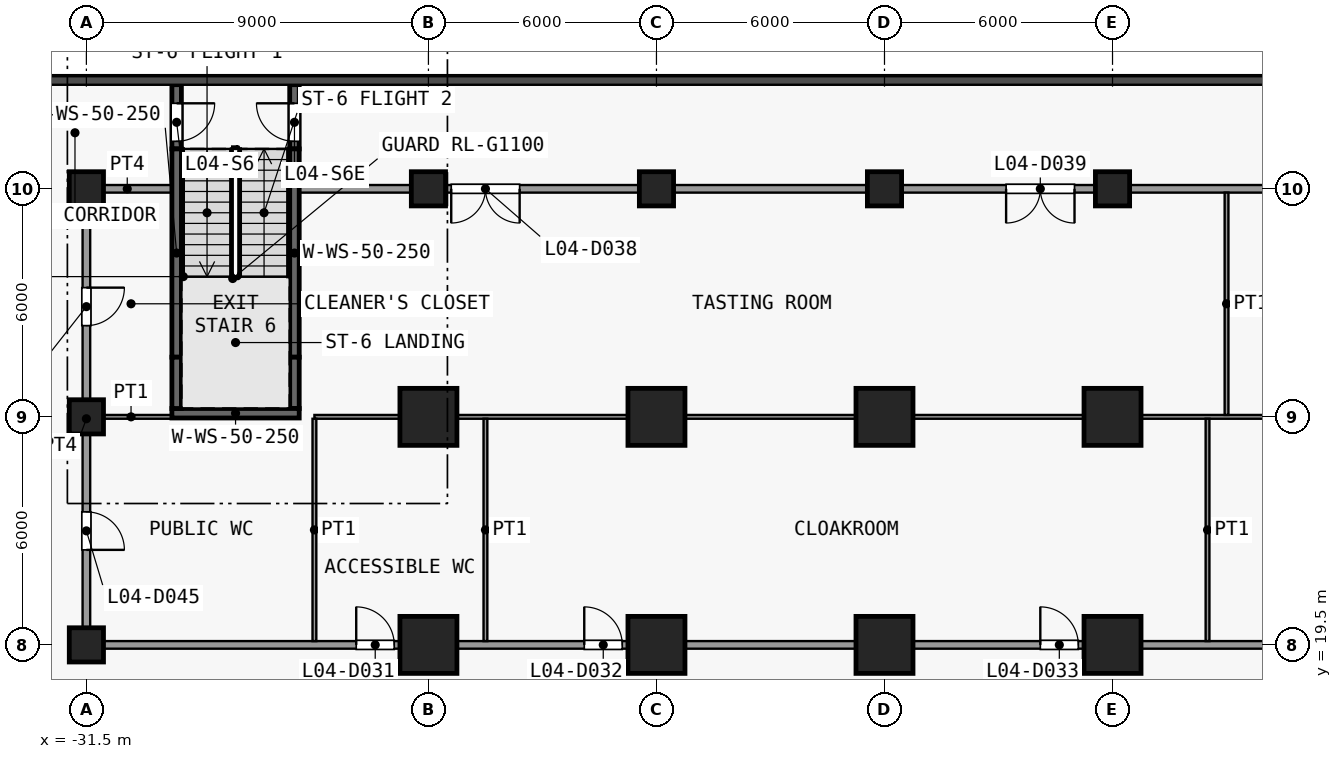
"""IFC4 building model, lengths in metres.
Left out: names, types, materials, properties, quantities, classifications, styles, units other than length and angle.
Written with IfcOpenShell. Run it as: python <this file> out.ifc"""

import sys

from ifc_helpers import new_model, si_unit, direction, frame, frame_2d, origin, origin_2d, place, context, subcontext, project, spatial, rectangle, extrude, element, fill, save


model = new_model("IFC4")
c1 = context("Model", 3, precision=1e-05, world=origin(), true_north=direction((0.0, 1.0)))
c2 = subcontext(c1, "Body", "Model", "MODEL_VIEW")
j1 = project(units=[si_unit("LENGTHUNIT", "METRE"), si_unit("PLANEANGLEUNIT", "RADIAN")], contexts=[c1])
p1 = place(None, origin())
s1 = spatial("IfcSite", under=j1, at=p1, CompositionType="ELEMENT")
p2 = place(p1, origin())
s2 = spatial("IfcBuilding", under=s1, at=p2, CompositionType="ELEMENT")
p3 = place(p2, frame((0.0, 0.0, 23.5)))
s3 = spatial("IfcBuildingStorey", under=s2, at=p3, CompositionType="ELEMENT", Elevation=23.5)
for number, where, z_axis, x_axis in (
    (1, (-31.5, 19.5, 0.0), (0.0, 0.0, 1.0), (1.0, 0.0, 0.0)),
    (2, (-31.5, 25.5, 0.0), (0.0, 0.0, 1.0), (1.0, 0.0, 0.0)),
    (3, (-31.5, 31.5, 0.0), (0.0, 0.0, 1.0), (1.0, 0.0, 0.0)),
):
    element("IfcColumn", number, at=place(p3, frame(where, z_axis=z_axis, x_axis=x_axis)), inside=s3, PredefinedType="COLUMN", context=c2, shape_type="SweptSolid", body=[
        extrude(rectangle(XDim=0.9, YDim=0.9, at=origin_2d()), origin(), (0.0, 0.0, 1.0), 4.5),
    ])
for number, where, z_axis, x_axis in (
    (4, (-22.5, 19.5, 0.0), (0.0, 0.0, 1.0), (1.0, 0.0, 0.0)),
    (5, (-22.5, 25.5, 0.0), (0.0, 0.0, 1.0), (1.0, 0.0, 0.0)),
):
    element("IfcColumn", number, at=place(p3, frame(where, z_axis=z_axis, x_axis=x_axis)), inside=s3, PredefinedType="COLUMN", context=c2, shape_type="SweptSolid", body=[
        extrude(rectangle(XDim=1.5, YDim=1.5, at=origin_2d()), origin(), (0.0, 0.0, 1.0), 4.5),
    ])
p4 = place(p3, frame((-22.5, 31.5, 0.0), z_axis=(0.0, 0.0, 1.0), x_axis=(1.0, 0.0, 0.0)))
e6 = element("IfcColumn", 6, at=p4, inside=s3, PredefinedType="COLUMN", context=c2, shape_type="SweptSolid", body=[
    extrude(rectangle(XDim=0.9, YDim=0.9, at=origin_2d()), origin(), (0.0, 0.0, 1.0), 4.5),
])
for number, where, z_axis, x_axis in (
    (7, (-16.5, 19.5, 0.0), (0.0, 0.0, 1.0), (1.0, 0.0, 0.0)),
    (8, (-16.5, 25.5, 0.0), (0.0, 0.0, 1.0), (1.0, 0.0, 0.0)),
):
    element("IfcColumn", number, at=place(p3, frame(where, z_axis=z_axis, x_axis=x_axis)), inside=s3, PredefinedType="COLUMN", context=c2, shape_type="SweptSolid", body=[
        extrude(rectangle(XDim=1.5, YDim=1.5, at=origin_2d()), origin(), (0.0, 0.0, 1.0), 4.5),
    ])
p5 = place(p3, frame((-16.5, 31.5, 0.0), z_axis=(0.0, 0.0, 1.0), x_axis=(1.0, 0.0, 0.0)))
e9 = element("IfcColumn", 9, at=p5, inside=s3, PredefinedType="COLUMN", context=c2, shape_type="SweptSolid", body=[
    extrude(rectangle(XDim=0.9, YDim=0.9, at=origin_2d()), origin(), (0.0, 0.0, 1.0), 4.5),
])
for number, where, z_axis, x_axis in (
    (10, (-10.5, 19.5, 0.0), (0.0, 0.0, 1.0), (1.0, 0.0, 0.0)),
    (11, (-10.5, 25.5, 0.0), (0.0, 0.0, 1.0), (1.0, 0.0, 0.0)),
):
    element("IfcColumn", number, at=place(p3, frame(where, z_axis=z_axis, x_axis=x_axis)), inside=s3, PredefinedType="COLUMN", context=c2, shape_type="SweptSolid", body=[
        extrude(rectangle(XDim=1.5, YDim=1.5, at=origin_2d()), origin(), (0.0, 0.0, 1.0), 4.5),
    ])
p6 = place(p3, frame((-10.5, 31.5, 0.0), z_axis=(0.0, 0.0, 1.0), x_axis=(1.0, 0.0, 0.0)))
e12 = element("IfcColumn", 12, at=p6, inside=s3, PredefinedType="COLUMN", context=c2, shape_type="SweptSolid", body=[
    extrude(rectangle(XDim=0.9, YDim=0.9, at=origin_2d()), origin(), (0.0, 0.0, 1.0), 4.5),
])
for number, where, z_axis, x_axis in (
    (13, (-4.5, 19.5, 0.0), (0.0, 0.0, 1.0), (1.0, 0.0, 0.0)),
    (14, (-4.5, 25.5, 0.0), (0.0, 0.0, 1.0), (1.0, 0.0, 0.0)),
):
    element("IfcColumn", number, at=place(p3, frame(where, z_axis=z_axis, x_axis=x_axis)), inside=s3, PredefinedType="COLUMN", context=c2, shape_type="SweptSolid", body=[
        extrude(rectangle(XDim=1.5, YDim=1.5, at=origin_2d()), origin(), (0.0, 0.0, 1.0), 4.5),
    ])
p7 = place(p3, frame((-4.5, 31.5, 0.0), z_axis=(0.0, 0.0, 1.0), x_axis=(1.0, 0.0, 0.0)))
e15 = element("IfcColumn", 15, at=p7, inside=s3, PredefinedType="COLUMN", context=c2, shape_type="SweptSolid", body=[
    extrude(rectangle(XDim=0.9, YDim=0.9, at=origin_2d()), origin(), (0.0, 0.0, 1.0), 4.5),
])
p8 = place(p3, frame((-29.125, 34.24, 0.0), z_axis=(0.0, 0.0, 1.0), x_axis=(0.0, -1.0, 0.0)))
e16 = element("IfcWall", 16, at=p8, inside=s3, PredefinedType="SHEAR", context=c2, shape_type="SweptSolid", body=[
    extrude(rectangle(XDim=1.69, YDim=0.25, at=frame_2d((0.845, 0.0))), origin(), (0.0, 0.0, 1.0), 4.15),
])
p9 = place(p8, frame((0.49, 0.0, 0.0)))
e17 = element("IfcOpeningElement", 17, at=p9, cuts=e16, PredefinedType="OPENING", context=c2, shape_type="SweptSolid", body=[
    extrude(rectangle(XDim=1.0, YDim=2.1, at=frame_2d((0.5, 1.05))), frame((0.0, 0.135, 0.0), z_axis=(0.0, -1.0, 0.0), x_axis=(1.0, 0.0, 0.0)), (0.0, 0.0, 1.0), 0.27),
])
p10 = place(p3, frame((-29.125, 27.07, 0.0), z_axis=(0.0, 0.0, 1.0), x_axis=(0.0, 1.0, 0.0)))
e18 = element("IfcWall", 18, at=p10, inside=s3, PredefinedType="SHEAR", context=c2, shape_type="SweptSolid", body=[
    extrude(rectangle(XDim=5.48, YDim=0.25, at=frame_2d((2.74, 0.0))), origin(), (0.0, 0.0, 1.0), 4.15),
])
p11 = place(p3, frame((-29.125, 25.72, 0.0), z_axis=(0.0, 0.0, 1.0), x_axis=(0.0, 1.0, 0.0)))
e19 = element("IfcWall", 19, at=p11, inside=s3, PredefinedType="SHEAR", context=c2, shape_type="SweptSolid", body=[
    extrude(rectangle(XDim=1.35, YDim=0.25, at=frame_2d((0.675, 0.0))), origin(), (0.0, 0.0, 1.0), 4.15),
])
p12 = place(p3, frame((-26.025, 32.55, 0.0), z_axis=(0.0, 0.0, 1.0), x_axis=(0.0, 1.0, 0.0)))
e20 = element("IfcWall", 20, at=p12, inside=s3, PredefinedType="SHEAR", context=c2, shape_type="SweptSolid", body=[
    extrude(rectangle(XDim=1.69, YDim=0.25, at=frame_2d((0.845, 0.0))), origin(), (0.0, 0.0, 1.0), 4.15),
])
p13 = place(p12, frame((0.2, 0.0, 0.0)))
e21 = element("IfcOpeningElement", 21, at=p13, cuts=e20, PredefinedType="OPENING", context=c2, shape_type="SweptSolid", body=[
    extrude(rectangle(XDim=1.0, YDim=2.1, at=frame_2d((0.5, 1.05))), frame((0.0, 0.135, 0.0), z_axis=(0.0, -1.0, 0.0), x_axis=(1.0, 0.0, 0.0)), (0.0, 0.0, 1.0), 0.27),
])
p14 = place(p3, frame((-26.025, 27.07, 0.0), z_axis=(0.0, 0.0, 1.0), x_axis=(0.0, 1.0, 0.0)))
e22 = element("IfcWall", 22, at=p14, inside=s3, PredefinedType="SHEAR", context=c2, shape_type="SweptSolid", body=[
    extrude(rectangle(XDim=5.48, YDim=0.25, at=frame_2d((2.74, 0.0))), origin(), (0.0, 0.0, 1.0), 4.15),
])
p15 = place(p3, frame((-26.025, 25.72, 0.0), z_axis=(0.0, 0.0, 1.0), x_axis=(0.0, 1.0, 0.0)))
e23 = element("IfcWall", 23, at=p15, inside=s3, PredefinedType="SHEAR", context=c2, shape_type="SweptSolid", body=[
    extrude(rectangle(XDim=1.35, YDim=0.25, at=frame_2d((0.675, 0.0))), origin(), (0.0, 0.0, 1.0), 4.15),
])
p16 = place(p3, frame((-29.25, 25.595, 0.0), z_axis=(0.0, 0.0, 1.0), x_axis=(1.0, 0.0, 0.0)))
e24 = element("IfcWall", 24, at=p16, inside=s3, PredefinedType="SHEAR", context=c2, shape_type="SweptSolid", body=[
    extrude(rectangle(XDim=3.35, YDim=0.25, at=frame_2d((1.675, 0.0))), origin(), (0.0, 0.0, 1.0), 4.15),
])
p17 = place(p3, frame((-31.6, 19.5, 0.0), z_axis=(0.0, 0.0, 1.0), x_axis=(1.0, 0.0, 0.0)))
e25 = element("IfcWall", 25, at=p17, inside=s3, PredefinedType="PARTITIONING", context=c2, shape_type="SweptSolid", body=[
    extrude(rectangle(XDim=60.1, YDim=0.2, at=frame_2d((30.05, 0.0))), origin(), (0.0, 0.0, 1.0), 4.15),
])
p18 = place(p17, frame((7.2, 0.0, 0.0)))
e26 = element("IfcOpeningElement", 26, at=p18, cuts=e25, PredefinedType="OPENING", context=c2, shape_type="SweptSolid", body=[
    extrude(rectangle(XDim=1.0, YDim=2.1, at=frame_2d((0.5, 1.05))), frame((0.0, 0.11, 0.0), z_axis=(0.0, -1.0, 0.0), x_axis=(1.0, 0.0, 0.0)), (0.0, 0.0, 1.0), 0.22),
])
p19 = place(p17, frame((13.2, 0.0, 0.0)))
e27 = element("IfcOpeningElement", 27, at=p19, cuts=e25, PredefinedType="OPENING", context=c2, shape_type="SweptSolid", body=[
    extrude(rectangle(XDim=1.0, YDim=2.1, at=frame_2d((0.5, 1.05))), frame((0.0, 0.11, 0.0), z_axis=(0.0, -1.0, 0.0), x_axis=(1.0, 0.0, 0.0)), (0.0, 0.0, 1.0), 0.22),
])
p20 = place(p17, frame((25.2, 0.0, 0.0)))
e28 = element("IfcOpeningElement", 28, at=p20, cuts=e25, PredefinedType="OPENING", context=c2, shape_type="SweptSolid", body=[
    extrude(rectangle(XDim=1.0, YDim=2.1, at=frame_2d((0.5, 1.05))), frame((0.0, 0.11, 0.0), z_axis=(0.0, -1.0, 0.0), x_axis=(1.0, 0.0, 0.0)), (0.0, 0.0, 1.0), 0.22),
])
p21 = place(p17, frame((33.5, 0.0, 0.0)))
e29 = element("IfcOpeningElement", 29, at=p21, cuts=e25, PredefinedType="OPENING", context=c2, shape_type="SweptSolid", body=[
    extrude(rectangle(XDim=1.8, YDim=2.1, at=frame_2d((0.9, 1.05))), frame((0.0, 0.11, 0.0), z_axis=(0.0, -1.0, 0.0), x_axis=(1.0, 0.0, 0.0)), (0.0, 0.0, 1.0), 0.22),
])
p22 = place(p17, frame((49.0, 0.0, 0.0)))
e30 = element("IfcOpeningElement", 30, at=p22, cuts=e25, PredefinedType="OPENING", context=c2, shape_type="SweptSolid", body=[
    extrude(rectangle(XDim=1.8, YDim=2.1, at=frame_2d((0.9, 1.05))), frame((0.0, 0.11, 0.0), z_axis=(0.0, -1.0, 0.0), x_axis=(1.0, 0.0, 0.0)), (0.0, 0.0, 1.0), 0.22),
])
p23 = place(p17, frame((55.0, 0.0, 0.0)))
e31 = element("IfcOpeningElement", 31, at=p23, cuts=e25, PredefinedType="OPENING", context=c2, shape_type="SweptSolid", body=[
    extrude(rectangle(XDim=1.0, YDim=2.1, at=frame_2d((0.5, 1.05))), frame((0.0, 0.11, 0.0), z_axis=(0.0, -1.0, 0.0), x_axis=(1.0, 0.0, 0.0)), (0.0, 0.0, 1.0), 0.22),
])
p24 = place(p17, frame((58.3, 0.0, 0.0)))
e32 = element("IfcOpeningElement", 32, at=p24, cuts=e25, PredefinedType="OPENING", context=c2, shape_type="SweptSolid", body=[
    extrude(rectangle(XDim=1.0, YDim=2.1, at=frame_2d((0.5, 1.05))), frame((0.0, 0.11, 0.0), z_axis=(0.0, -1.0, 0.0), x_axis=(1.0, 0.0, 0.0)), (0.0, 0.0, 1.0), 0.22),
])
p25 = place(p3, frame((-31.4, 25.5, 0.0), z_axis=(0.0, 0.0, 1.0), x_axis=(1.0, 0.0, 0.0)))
e33 = element("IfcWall", 33, at=p25, inside=s3, PredefinedType="PARTITIONING", context=c2, shape_type="SweptSolid", body=[
    extrude(rectangle(XDim=2.15, YDim=0.1, at=frame_2d((1.075, 0.0))), origin(), (0.0, 0.0, 1.0), 4.15),
])
p26 = place(p3, frame((-25.5, 25.5, 0.0), z_axis=(0.0, 0.0, 1.0), x_axis=(1.0, 0.0, 0.0)))
e34 = element("IfcWall", 34, at=p26, inside=s3, PredefinedType="PARTITIONING", context=c2, shape_type="SweptSolid", body=[
    extrude(rectangle(XDim=77.75, YDim=0.1, at=frame_2d((38.875, 0.0))), origin(), (0.0, 0.0, 1.0), 4.15),
])
p27 = place(p3, frame((-31.6, 31.5, 0.0), z_axis=(0.0, 0.0, 1.0), x_axis=(1.0, 0.0, 0.0)))
e35 = element("IfcWall", 35, at=p27, inside=s3, PredefinedType="PARTITIONING", context=c2, shape_type="SweptSolid", body=[
    extrude(rectangle(XDim=2.35, YDim=0.2, at=frame_2d((1.175, 0.0))), origin(), (0.0, 0.0, 1.0), 4.15),
])
p28 = place(p3, frame((-25.9, 31.5, 0.0), z_axis=(0.0, 0.0, 1.0), x_axis=(1.0, 0.0, 0.0)))
e36 = element("IfcWall", 36, at=p28, inside=s3, PredefinedType="PARTITIONING", context=c2, shape_type="SweptSolid", body=[
    extrude(rectangle(XDim=78.15, YDim=0.2, at=frame_2d((39.075, 0.0))), origin(), (0.0, 0.0, 1.0), 4.15),
])
p29 = place(p28, frame((4.0, 0.0, 0.0)))
e37 = element("IfcOpeningElement", 37, at=p29, cuts=e36, PredefinedType="OPENING", context=c2, shape_type="SweptSolid", body=[
    extrude(rectangle(XDim=1.8, YDim=2.1, at=frame_2d((0.9, 1.05))), frame((0.0, 0.11, 0.0), z_axis=(0.0, -1.0, 0.0), x_axis=(1.0, 0.0, 0.0)), (0.0, 0.0, 1.0), 0.22),
])
p30 = place(p28, frame((18.6, 0.0, 0.0)))
e38 = element("IfcOpeningElement", 38, at=p30, cuts=e36, PredefinedType="OPENING", context=c2, shape_type="SweptSolid", body=[
    extrude(rectangle(XDim=1.8, YDim=2.1, at=frame_2d((0.9, 1.05))), frame((0.0, 0.11, 0.0), z_axis=(0.0, -1.0, 0.0), x_axis=(1.0, 0.0, 0.0)), (0.0, 0.0, 1.0), 0.22),
])
p31 = place(p28, frame((28.8, 0.0, 0.0)))
e39 = element("IfcOpeningElement", 39, at=p31, cuts=e36, PredefinedType="OPENING", context=c2, shape_type="SweptSolid", body=[
    extrude(rectangle(XDim=1.0, YDim=2.1, at=frame_2d((0.5, 1.05))), frame((0.0, 0.11, 0.0), z_axis=(0.0, -1.0, 0.0), x_axis=(1.0, 0.0, 0.0)), (0.0, 0.0, 1.0), 0.22),
])
p32 = place(p28, frame((37.8, 0.0, 0.0)))
e40 = element("IfcOpeningElement", 40, at=p32, cuts=e36, PredefinedType="OPENING", context=c2, shape_type="SweptSolid", body=[
    extrude(rectangle(XDim=1.0, YDim=2.1, at=frame_2d((0.5, 1.05))), frame((0.0, 0.11, 0.0), z_axis=(0.0, -1.0, 0.0), x_axis=(1.0, 0.0, 0.0)), (0.0, 0.0, 1.0), 0.22),
])
p33 = place(p28, frame((49.5, 0.0, 0.0)))
e41 = element("IfcOpeningElement", 41, at=p33, cuts=e36, PredefinedType="OPENING", context=c2, shape_type="SweptSolid", body=[
    extrude(rectangle(XDim=1.0, YDim=2.1, at=frame_2d((0.5, 1.05))), frame((0.0, 0.11, 0.0), z_axis=(0.0, -1.0, 0.0), x_axis=(1.0, 0.0, 0.0)), (0.0, 0.0, 1.0), 0.22),
])
p34 = place(p28, frame((58.3, 0.0, 0.0)))
e42 = element("IfcOpeningElement", 42, at=p34, cuts=e36, PredefinedType="OPENING", context=c2, shape_type="SweptSolid", body=[
    extrude(rectangle(XDim=1.0, YDim=2.1, at=frame_2d((0.5, 1.05))), frame((0.0, 0.11, 0.0), z_axis=(0.0, -1.0, 0.0), x_axis=(1.0, 0.0, 0.0)), (0.0, 0.0, 1.0), 0.22),
])
p35 = place(p28, frame((72.8, 0.0, 0.0)))
e43 = element("IfcOpeningElement", 43, at=p35, cuts=e36, PredefinedType="OPENING", context=c2, shape_type="SweptSolid", body=[
    extrude(rectangle(XDim=1.0, YDim=2.1, at=frame_2d((0.5, 1.05))), frame((0.0, 0.11, 0.0), z_axis=(0.0, -1.0, 0.0), x_axis=(1.0, 0.0, 0.0)), (0.0, 0.0, 1.0), 0.22),
])
p36 = place(p3, frame((-31.5, 19.6, 0.0), z_axis=(0.0, 0.0, 1.0), x_axis=(0.0, 1.0, 0.0)))
e44 = element("IfcWall", 44, at=p36, inside=s3, PredefinedType="PARTITIONING", context=c2, shape_type="SweptSolid", body=[
    extrude(rectangle(XDim=11.8, YDim=0.2, at=frame_2d((5.9, 0.0))), origin(), (0.0, 0.0, 1.0), 4.15),
])
p37 = place(p36, frame((2.4, 0.0, 0.0)))
e45 = element("IfcOpeningElement", 45, at=p37, cuts=e44, PredefinedType="OPENING", context=c2, shape_type="SweptSolid", body=[
    extrude(rectangle(XDim=1.0, YDim=2.1, at=frame_2d((0.5, 1.05))), frame((0.0, 0.11, 0.0), z_axis=(0.0, -1.0, 0.0), x_axis=(1.0, 0.0, 0.0)), (0.0, 0.0, 1.0), 0.22),
])
p38 = place(p36, frame((8.3, 0.0, 0.0)))
e46 = element("IfcOpeningElement", 46, at=p38, cuts=e44, PredefinedType="OPENING", context=c2, shape_type="SweptSolid", body=[
    extrude(rectangle(XDim=1.0, YDim=2.1, at=frame_2d((0.5, 1.05))), frame((0.0, 0.11, 0.0), z_axis=(0.0, -1.0, 0.0), x_axis=(1.0, 0.0, 0.0)), (0.0, 0.0, 1.0), 0.22),
])
for number, where, z_axis, x_axis in (
    (47, (-25.5, 19.6, 0.0), (0.0, 0.0, 1.0), (0.0, 1.0, 0.0)),
    (48, (-21.0, 19.6, 0.0), (0.0, 0.0, 1.0), (0.0, 1.0, 0.0)),
    (49, (-2.0, 19.6, 0.0), (0.0, 0.0, 1.0), (0.0, 1.0, 0.0)),
    (50, (-1.5, 25.55, 0.0), (0.0, 0.0, 1.0), (0.0, 1.0, 0.0)),
):
    element("IfcWall", number, at=place(p3, frame(where, z_axis=z_axis, x_axis=x_axis)), inside=s3, PredefinedType="PARTITIONING", context=c2, shape_type="SweptSolid", body=[
        extrude(rectangle(XDim=5.85, YDim=0.1, at=frame_2d((2.925, 0.0))), origin(), (0.0, 0.0, 1.0), 4.15),
    ])
p39 = place(p9, origin())
e51 = element("IfcDoor", 51, at=p39, inside=s3, OperationType="SINGLE_SWING_LEFT", PredefinedType="DOOR", context=c2, shape_type="SweptSolid", body=[
    extrude(rectangle(XDim=1.0, YDim=2.1, at=frame_2d((0.5, 1.05))), frame((0.0, 0.025, 0.0), z_axis=(0.0, -1.0, 0.0), x_axis=(1.0, 0.0, 0.0)), (0.0, 0.0, 1.0), 0.05),
])
fill(e17, e51)
p40 = place(p13, origin())
e52 = element("IfcDoor", 52, at=p40, inside=s3, OperationType="SINGLE_SWING_RIGHT", PredefinedType="DOOR", context=c2, shape_type="SweptSolid", body=[
    extrude(rectangle(XDim=1.0, YDim=2.1, at=frame_2d((0.5, 1.05))), frame((0.0, 0.025, 0.0), z_axis=(0.0, -1.0, 0.0), x_axis=(1.0, 0.0, 0.0)), (0.0, 0.0, 1.0), 0.05),
])
fill(e21, e52)
p41 = place(p18, origin())
e53 = element("IfcDoor", 53, at=p41, inside=s3, OperationType="SINGLE_SWING_RIGHT", PredefinedType="DOOR", context=c2, shape_type="SweptSolid", body=[
    extrude(rectangle(XDim=1.0, YDim=2.1, at=frame_2d((0.5, 1.05))), frame((0.0, 0.025, 0.0), z_axis=(0.0, -1.0, 0.0), x_axis=(1.0, 0.0, 0.0)), (0.0, 0.0, 1.0), 0.05),
])
fill(e26, e53)
p42 = place(p19, origin())
e54 = element("IfcDoor", 54, at=p42, inside=s3, OperationType="SINGLE_SWING_RIGHT", PredefinedType="DOOR", context=c2, shape_type="SweptSolid", body=[
    extrude(rectangle(XDim=1.0, YDim=2.1, at=frame_2d((0.5, 1.05))), frame((0.0, 0.025, 0.0), z_axis=(0.0, -1.0, 0.0), x_axis=(1.0, 0.0, 0.0)), (0.0, 0.0, 1.0), 0.05),
])
fill(e27, e54)
p43 = place(p20, origin())
e55 = element("IfcDoor", 55, at=p43, inside=s3, OperationType="SINGLE_SWING_RIGHT", PredefinedType="DOOR", context=c2, shape_type="SweptSolid", body=[
    extrude(rectangle(XDim=1.0, YDim=2.1, at=frame_2d((0.5, 1.05))), frame((0.0, 0.025, 0.0), z_axis=(0.0, -1.0, 0.0), x_axis=(1.0, 0.0, 0.0)), (0.0, 0.0, 1.0), 0.05),
])
fill(e28, e55)
p44 = place(p29, origin())
e56 = element("IfcDoor", 56, at=p44, inside=s3, OperationType="DOUBLE_DOOR_SINGLE_SWING", PredefinedType="DOOR", context=c2, shape_type="SweptSolid", body=[
    extrude(rectangle(XDim=1.8, YDim=2.1, at=frame_2d((0.9, 1.05))), frame((0.0, 0.025, 0.0), z_axis=(0.0, -1.0, 0.0), x_axis=(1.0, 0.0, 0.0)), (0.0, 0.0, 1.0), 0.05),
])
fill(e37, e56)
p45 = place(p30, origin())
e57 = element("IfcDoor", 57, at=p45, inside=s3, OperationType="DOUBLE_DOOR_SINGLE_SWING", PredefinedType="DOOR", context=c2, shape_type="SweptSolid", body=[
    extrude(rectangle(XDim=1.8, YDim=2.1, at=frame_2d((0.9, 1.05))), frame((0.0, 0.025, 0.0), z_axis=(0.0, -1.0, 0.0), x_axis=(1.0, 0.0, 0.0)), (0.0, 0.0, 1.0), 0.05),
])
fill(e38, e57)
p46 = place(p37, origin())
e58 = element("IfcDoor", 58, at=p46, inside=s3, OperationType="SINGLE_SWING_LEFT", PredefinedType="DOOR", context=c2, shape_type="SweptSolid", body=[
    extrude(rectangle(XDim=1.0, YDim=2.1, at=frame_2d((0.5, 1.05))), frame((0.0, 0.025, 0.0), z_axis=(0.0, -1.0, 0.0), x_axis=(1.0, 0.0, 0.0)), (0.0, 0.0, 1.0), 0.05),
])
fill(e45, e58)
p47 = place(p38, origin())
e59 = element("IfcDoor", 59, at=p47, inside=s3, OperationType="SINGLE_SWING_RIGHT", PredefinedType="DOOR", context=c2, shape_type="SweptSolid", body=[
    extrude(rectangle(XDim=1.0, YDim=2.1, at=frame_2d((0.5, 1.05))), frame((0.0, 0.025, 0.0), z_axis=(0.0, -1.0, 0.0), x_axis=(1.0, 0.0, 0.0)), (0.0, 0.0, 1.0), 0.05),
])
fill(e46, e59)
save(model, sys.argv[1])
